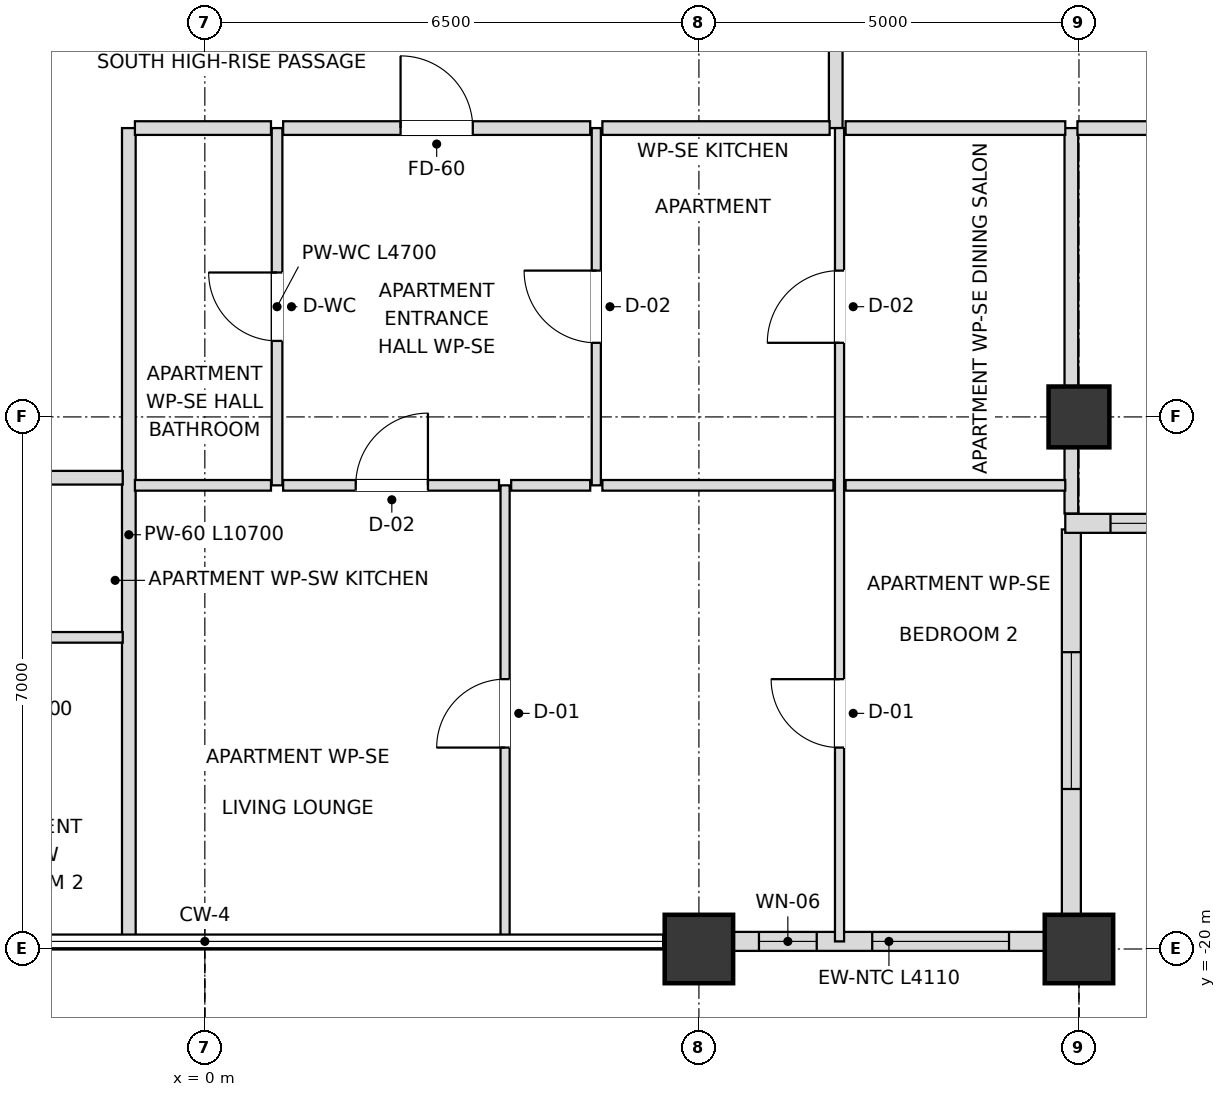
"""IFC4 building model, lengths in metres.
Left out: names, types, materials, properties, quantities, classifications, styles, units other than length and angle.
Written with IfcOpenShell. Run it as: python <this file> out.ifc"""

import sys

from ifc_helpers import new_model, si_unit, direction, frame, frame_2d, origin, origin_2d, place, context, subcontext, project, spatial, rectangle, extrude, element, fill, save


model = new_model("IFC4")
c1 = context("Model", 3, precision=1e-05, world=origin(), true_north=direction((0.0, 1.0)))
c2 = subcontext(c1, "Body", "Model", "MODEL_VIEW")
j1 = project(units=[si_unit("LENGTHUNIT", "METRE"), si_unit("PLANEANGLEUNIT", "RADIAN")], contexts=[c1])
p1 = place(None, origin())
s1 = spatial("IfcSite", under=j1, at=p1, CompositionType="ELEMENT")
p2 = place(p1, origin())
s2 = spatial("IfcBuilding", under=s1, at=p2, CompositionType="ELEMENT")
p3 = place(p2, frame((0.0, 0.0, 261.9)))
s3 = spatial("IfcBuildingStorey", under=s2, at=p3, CompositionType="ELEMENT", Elevation=261.9)
for number, where, z_axis, x_axis in (
    (1, (6.5, -20.0, 0.0), (0.0, 0.0, 1.0), (1.0, 0.0, 0.0)),
    (2, (11.5, -20.0, 0.0), (0.0, 0.0, 1.0), (1.0, 0.0, 0.0)),
):
    element("IfcColumn", number, at=place(p3, frame(where, z_axis=z_axis, x_axis=x_axis)), inside=s3, PredefinedType="USERDEFINED", context=c2, shape_type="SweptSolid", body=[
        extrude(rectangle(XDim=0.9, YDim=0.9, at=origin_2d()), origin(), (0.0, 0.0, 1.0), 3.6),
    ])
p4 = place(p3, frame((11.5, -13.0, 0.0), z_axis=(0.0, 0.0, 1.0), x_axis=(1.0, 0.0, 0.0)))
e3 = element("IfcColumn", 3, at=p4, inside=s3, PredefinedType="COLUMN", context=c2, shape_type="SweptSolid", body=[
    extrude(rectangle(XDim=0.8, YDim=0.8, at=origin_2d()), origin(), (0.0, 0.0, 1.0), 3.6),
])
p5 = place(p3, frame((6.945, -19.9, 0.0), z_axis=(0.0, 0.0, 1.0), x_axis=(1.0, 0.0, 0.0)))
e4 = element("IfcWall", 4, at=p5, inside=s3, PredefinedType="SOLIDWALL", context=c2, shape_type="SweptSolid", body=[
    extrude(rectangle(XDim=4.11, YDim=0.25, at=frame_2d((2.055, 0.0))), origin(), (0.0, 0.0, 1.0), 2.748),
])
p6 = place(p5, frame((0.345, 0.0, 0.72)))
e5 = element("IfcOpeningElement", 5, at=p6, cuts=e4, PredefinedType="OPENING", context=c2, shape_type="SweptSolid", body=[
    extrude(rectangle(XDim=0.76, YDim=1.68, at=frame_2d((0.38, 0.84))), frame((0.0, 0.135, 0.0), z_axis=(0.0, -1.0, 0.0), x_axis=(1.0, 0.0, 0.0)), (0.0, 0.0, 1.0), 0.27),
])
p7 = place(p5, frame((1.835, 0.0, 0.72)))
e6 = element("IfcOpeningElement", 6, at=p7, cuts=e4, PredefinedType="OPENING", context=c2, shape_type="SweptSolid", body=[
    extrude(rectangle(XDim=1.8, YDim=1.68, at=frame_2d((0.9, 0.84))), frame((0.0, 0.135, 0.0), z_axis=(0.0, -1.0, 0.0), x_axis=(1.0, 0.0, 0.0)), (0.0, 0.0, 1.0), 0.27),
])
p8 = place(p3, frame((11.4, -19.82, 0.0), z_axis=(0.0, 0.0, 1.0), x_axis=(0.0, 1.0, 0.0)))
e7 = element("IfcWall", 7, at=p8, inside=s3, PredefinedType="SOLIDWALL", context=c2, shape_type="SweptSolid", body=[
    extrude(rectangle(XDim=5.34, YDim=0.25, at=frame_2d((2.67, 0.0))), origin(), (0.0, 0.0, 1.0), 2.748),
])
p9 = place(p8, frame((1.925, 0.0, 0.72)))
e8 = element("IfcOpeningElement", 8, at=p9, cuts=e7, PredefinedType="OPENING", context=c2, shape_type="SweptSolid", body=[
    extrude(rectangle(XDim=1.8, YDim=1.68, at=frame_2d((0.9, 0.84))), frame((0.0, 0.135, 0.0), z_axis=(0.0, -1.0, 0.0), x_axis=(1.0, 0.0, 0.0)), (0.0, 0.0, 1.0), 0.27),
])
p10 = place(p3, frame((11.32, -14.4, 0.0), z_axis=(0.0, 0.0, 1.0), x_axis=(1.0, 0.0, 0.0)))
e9 = element("IfcWall", 9, at=p10, inside=s3, PredefinedType="SOLIDWALL", context=c2, shape_type="SweptSolid", body=[
    extrude(rectangle(XDim=5.66, YDim=0.25, at=frame_2d((2.83, 0.0))), origin(), (0.0, 0.0, 1.0), 2.748),
])
p11 = place(p10, frame((0.595, 0.0, 0.72)))
e10 = element("IfcOpeningElement", 10, at=p11, cuts=e9, PredefinedType="OPENING", context=c2, shape_type="SweptSolid", body=[
    extrude(rectangle(XDim=1.8, YDim=1.68, at=frame_2d((0.9, 0.84))), frame((0.0, 0.135, 0.0), z_axis=(0.0, -1.0, 0.0), x_axis=(1.0, 0.0, 0.0)), (0.0, 0.0, 1.0), 0.27),
])
p12 = place(p10, frame((3.265, 0.0, 0.72)))
e11 = element("IfcOpeningElement", 11, at=p12, cuts=e9, PredefinedType="OPENING", context=c2, shape_type="SweptSolid", body=[
    extrude(rectangle(XDim=1.8, YDim=1.68, at=frame_2d((0.9, 0.84))), frame((0.0, 0.135, 0.0), z_axis=(0.0, -1.0, 0.0), x_axis=(1.0, 0.0, 0.0)), (0.0, 0.0, 1.0), 0.27),
])
p13 = place(p3, frame((-1.0, -19.9, 0.0), z_axis=(0.0, 0.0, 1.0), x_axis=(0.0, 1.0, 0.0)))
e12 = element("IfcWall", 12, at=p13, inside=s3, PredefinedType="PARTITIONING", context=c2, shape_type="SweptSolid", body=[
    extrude(rectangle(XDim=10.7, YDim=0.18, at=frame_2d((5.35, 0.0))), origin(), (0.0, 0.0, 1.0), 3.018),
])
p14 = place(p3, frame((0.95, -13.9, 0.0), z_axis=(0.0, 0.0, 1.0), x_axis=(0.0, 1.0, 0.0)))
e13 = element("IfcWall", 13, at=p14, inside=s3, PredefinedType="PARTITIONING", context=c2, shape_type="SweptSolid", body=[
    extrude(rectangle(XDim=4.7, YDim=0.14, at=frame_2d((2.35, 0.0))), origin(), (0.0, 0.0, 1.0), 3.38),
])
p15 = place(p14, frame((1.9, 0.0, 0.0)))
e14 = element("IfcOpeningElement", 14, at=p15, cuts=e13, PredefinedType="OPENING", context=c2, shape_type="SweptSolid", body=[
    extrude(rectangle(XDim=0.9, YDim=2.1, at=frame_2d((0.45, 1.05))), frame((0.0, 0.08, 0.0), z_axis=(0.0, -1.0, 0.0), x_axis=(1.0, 0.0, 0.0)), (0.0, 0.0, 1.0), 0.16),
])
p16 = place(p3, frame((3.95, -19.9, 0.0), z_axis=(0.0, 0.0, 1.0), x_axis=(0.0, 1.0, 0.0)))
e15 = element("IfcWall", 15, at=p16, inside=s3, PredefinedType="PARTITIONING", context=c2, shape_type="SweptSolid", body=[
    extrude(rectangle(XDim=6.0, YDim=0.12, at=frame_2d((3.0, 0.0))), origin(), (0.0, 0.0, 1.0), 3.018),
])
p17 = place(p16, frame((2.55, 0.0, 0.0)))
e16 = element("IfcOpeningElement", 16, at=p17, cuts=e15, PredefinedType="OPENING", context=c2, shape_type="SweptSolid", body=[
    extrude(rectangle(XDim=0.9, YDim=2.1, at=frame_2d((0.45, 1.05))), frame((0.0, 0.07, 0.0), z_axis=(0.0, -1.0, 0.0), x_axis=(1.0, 0.0, 0.0)), (0.0, 0.0, 1.0), 0.14),
])
p18 = place(p3, frame((5.15, -13.9, 0.0), z_axis=(0.0, 0.0, 1.0), x_axis=(0.0, 1.0, 0.0)))
e17 = element("IfcWall", 17, at=p18, inside=s3, PredefinedType="PARTITIONING", context=c2, shape_type="SweptSolid", body=[
    extrude(rectangle(XDim=4.7, YDim=0.12, at=frame_2d((2.35, 0.0))), origin(), (0.0, 0.0, 1.0), 3.38),
])
p19 = place(p18, frame((1.875, 0.0, 0.0)))
e18 = element("IfcOpeningElement", 18, at=p19, cuts=e17, PredefinedType="OPENING", context=c2, shape_type="SweptSolid", body=[
    extrude(rectangle(XDim=0.95, YDim=2.1, at=frame_2d((0.475, 1.05))), frame((0.0, 0.07, 0.0), z_axis=(0.0, -1.0, 0.0), x_axis=(1.0, 0.0, 0.0)), (0.0, 0.0, 1.0), 0.14),
])
p20 = place(p3, frame((8.3, -9.2, 0.0), z_axis=(0.0, 0.0, 1.0), x_axis=(0.0, 1.0, 0.0)))
e19 = element("IfcWall", 19, at=p20, inside=s3, PredefinedType="PARTITIONING", context=c2, shape_type="SweptSolid", body=[
    extrude(rectangle(XDim=5.4, YDim=0.18, at=frame_2d((2.7, 0.0))), origin(), (0.0, 0.0, 1.0), 2.826),
])
p21 = place(p20, frame((3.125, 0.0, 0.0)))
e20 = element("IfcOpeningElement", 20, at=p21, cuts=e19, PredefinedType="OPENING", context=c2, shape_type="SweptSolid", body=[
    extrude(rectangle(XDim=0.95, YDim=2.15, at=frame_2d((0.475, 1.075))), frame((0.0, 0.1, 0.0), z_axis=(0.0, -1.0, 0.0), x_axis=(1.0, 0.0, 0.0)), (0.0, 0.0, 1.0), 0.2),
])
p22 = place(p3, frame((8.35, -19.9, 0.0), z_axis=(0.0, 0.0, 1.0), x_axis=(0.0, 1.0, 0.0)))
e21 = element("IfcWall", 21, at=p22, inside=s3, PredefinedType="PARTITIONING", context=c2, shape_type="SweptSolid", body=[
    extrude(rectangle(XDim=10.7, YDim=0.12, at=frame_2d((5.35, 0.0))), origin(), (0.0, 0.0, 1.0), 2.826),
])
p23 = place(p22, frame((7.875, 0.0, 0.0)))
e22 = element("IfcOpeningElement", 22, at=p23, cuts=e21, PredefinedType="OPENING", context=c2, shape_type="SweptSolid", body=[
    extrude(rectangle(XDim=0.95, YDim=2.1, at=frame_2d((0.475, 1.05))), frame((0.0, 0.07, 0.0), z_axis=(0.0, -1.0, 0.0), x_axis=(1.0, 0.0, 0.0)), (0.0, 0.0, 1.0), 0.14),
])
p24 = place(p22, frame((2.55, 0.0, 0.0)))
e23 = element("IfcOpeningElement", 23, at=p24, cuts=e21, PredefinedType="OPENING", context=c2, shape_type="SweptSolid", body=[
    extrude(rectangle(XDim=0.9, YDim=2.1, at=frame_2d((0.45, 1.05))), frame((0.0, 0.07, 0.0), z_axis=(0.0, -1.0, 0.0), x_axis=(1.0, 0.0, 0.0)), (0.0, 0.0, 1.0), 0.14),
])
p25 = place(p3, frame((11.4, -14.27, 0.0), z_axis=(0.0, 0.0, 1.0), x_axis=(0.0, 1.0, 0.0)))
e24 = element("IfcWall", 24, at=p25, inside=s3, PredefinedType="PARTITIONING", context=c2, shape_type="SweptSolid", body=[
    extrude(rectangle(XDim=5.07, YDim=0.18, at=frame_2d((2.535, 0.0))), origin(), (0.0, 0.0, 1.0), 2.748),
])
p26 = place(p3, frame((-3.62, -15.9, 0.0), z_axis=(0.0, 0.0, 1.0), x_axis=(1.0, 0.0, 0.0)))
e25 = element("IfcWall", 25, at=p26, inside=s3, PredefinedType="PARTITIONING", context=c2, shape_type="SweptSolid", body=[
    extrude(rectangle(XDim=2.54, YDim=0.14, at=frame_2d((1.27, 0.0))), origin(), (0.0, 0.0, 1.0), 3.38),
])
p27 = place(p3, frame((-0.92, -13.9, 0.0), z_axis=(0.0, 0.0, 1.0), x_axis=(1.0, 0.0, 0.0)))
e26 = element("IfcWall", 26, at=p27, inside=s3, PredefinedType="PARTITIONING", context=c2, shape_type="SweptSolid", body=[
    extrude(rectangle(XDim=1.79, YDim=0.14, at=frame_2d((0.895, 0.0))), origin(), (0.0, 0.0, 1.0), 3.38),
])
p28 = place(p3, frame((1.03, -13.9, 0.0), z_axis=(0.0, 0.0, 1.0), x_axis=(1.0, 0.0, 0.0)))
e27 = element("IfcWall", 27, at=p28, inside=s3, PredefinedType="PARTITIONING", context=c2, shape_type="SweptSolid", body=[
    extrude(rectangle(XDim=2.84, YDim=0.14, at=frame_2d((1.42, 0.0))), origin(), (0.0, 0.0, 1.0), 3.38),
])
p29 = place(p28, frame((0.955, 0.0, 0.0)))
e28 = element("IfcOpeningElement", 28, at=p29, cuts=e27, PredefinedType="OPENING", context=c2, shape_type="SweptSolid", body=[
    extrude(rectangle(XDim=0.95, YDim=2.1, at=frame_2d((0.475, 1.05))), frame((0.0, 0.08, 0.0), z_axis=(0.0, -1.0, 0.0), x_axis=(1.0, 0.0, 0.0)), (0.0, 0.0, 1.0), 0.16),
])
p30 = place(p3, frame((4.03, -13.9, 0.0), z_axis=(0.0, 0.0, 1.0), x_axis=(1.0, 0.0, 0.0)))
e29 = element("IfcWall", 29, at=p30, inside=s3, PredefinedType="PARTITIONING", context=c2, shape_type="SweptSolid", body=[
    extrude(rectangle(XDim=1.04, YDim=0.14, at=frame_2d((0.52, 0.0))), origin(), (0.0, 0.0, 1.0), 3.38),
])
p31 = place(p3, frame((5.23, -13.9, 0.0), z_axis=(0.0, 0.0, 1.0), x_axis=(1.0, 0.0, 0.0)))
e30 = element("IfcWall", 30, at=p31, inside=s3, PredefinedType="PARTITIONING", context=c2, shape_type="SweptSolid", body=[
    extrude(rectangle(XDim=3.04, YDim=0.14, at=frame_2d((1.52, 0.0))), origin(), (0.0, 0.0, 1.0), 2.826),
])
p32 = place(p3, frame((8.43, -13.9, 0.0), z_axis=(0.0, 0.0, 1.0), x_axis=(1.0, 0.0, 0.0)))
e31 = element("IfcWall", 31, at=p32, inside=s3, PredefinedType="PARTITIONING", context=c2, shape_type="SweptSolid", body=[
    extrude(rectangle(XDim=2.89, YDim=0.14, at=frame_2d((1.445, 0.0))), origin(), (0.0, 0.0, 1.0), 3.38),
])
p33 = place(p3, frame((-3.62, -13.8, 0.0), z_axis=(0.0, 0.0, 1.0), x_axis=(1.0, 0.0, 0.0)))
e32 = element("IfcWall", 32, at=p33, inside=s3, PredefinedType="PARTITIONING", context=c2, shape_type="SweptSolid", body=[
    extrude(rectangle(XDim=2.54, YDim=0.18, at=frame_2d((1.27, 0.0))), origin(), (0.0, 0.0, 1.0), 3.38),
])
p34 = place(p3, frame((-0.92, -9.2, 0.0), z_axis=(0.0, 0.0, 1.0), x_axis=(1.0, 0.0, 0.0)))
e33 = element("IfcWall", 33, at=p34, inside=s3, PredefinedType="PARTITIONING", context=c2, shape_type="SweptSolid", body=[
    extrude(rectangle(XDim=1.79, YDim=0.18, at=frame_2d((0.895, 0.0))), origin(), (0.0, 0.0, 1.0), 3.38),
])
p35 = place(p3, frame((1.03, -9.2, 0.0), z_axis=(0.0, 0.0, 1.0), x_axis=(1.0, 0.0, 0.0)))
e34 = element("IfcWall", 34, at=p35, inside=s3, PredefinedType="PARTITIONING", context=c2, shape_type="SweptSolid", body=[
    extrude(rectangle(XDim=4.04, YDim=0.18, at=frame_2d((2.02, 0.0))), origin(), (0.0, 0.0, 1.0), 3.38),
])
p36 = place(p35, frame((1.545, 0.0, 0.0)))
e35 = element("IfcOpeningElement", 35, at=p36, cuts=e34, PredefinedType="OPENING", context=c2, shape_type="SweptSolid", body=[
    extrude(rectangle(XDim=0.95, YDim=2.15, at=frame_2d((0.475, 1.075))), frame((0.0, 0.1, 0.0), z_axis=(0.0, -1.0, 0.0), x_axis=(1.0, 0.0, 0.0)), (0.0, 0.0, 1.0), 0.2),
])
p37 = place(p3, frame((5.23, -9.2, 0.0), z_axis=(0.0, 0.0, 1.0), x_axis=(1.0, 0.0, 0.0)))
e36 = element("IfcWall", 36, at=p37, inside=s3, PredefinedType="PARTITIONING", context=c2, shape_type="SweptSolid", body=[
    extrude(rectangle(XDim=2.99, YDim=0.18, at=frame_2d((1.495, 0.0))), origin(), (0.0, 0.0, 1.0), 2.826),
])
p38 = place(p3, frame((8.43, -9.2, 0.0), z_axis=(0.0, 0.0, 1.0), x_axis=(1.0, 0.0, 0.0)))
e37 = element("IfcWall", 37, at=p38, inside=s3, PredefinedType="PARTITIONING", context=c2, shape_type="SweptSolid", body=[
    extrude(rectangle(XDim=2.89, YDim=0.18, at=frame_2d((1.445, 0.0))), origin(), (0.0, 0.0, 1.0), 3.38),
])
p39 = place(p3, frame((11.48, -9.2, 0.0), z_axis=(0.0, 0.0, 1.0), x_axis=(1.0, 0.0, 0.0)))
e38 = element("IfcWall", 38, at=p39, inside=s3, PredefinedType="PARTITIONING", context=c2, shape_type="SweptSolid", body=[
    extrude(rectangle(XDim=5.34, YDim=0.18, at=frame_2d((2.67, 0.0))), origin(), (0.0, 0.0, 1.0), 3.38),
])
p40 = place(p6, origin())
e39 = element("IfcWindow", 39, at=p40, inside=s3, PartitioningType="SINGLE_PANEL", PredefinedType="WINDOW", context=c2, shape_type="SweptSolid", body=[
    extrude(rectangle(XDim=0.76, YDim=1.68, at=frame_2d((0.38, 0.84))), frame((0.0, 0.03, 0.0), z_axis=(0.0, -1.0, 0.0), x_axis=(1.0, 0.0, 0.0)), (0.0, 0.0, 1.0), 0.06),
])
fill(e5, e39)
p41 = place(p7, origin())
e40 = element("IfcWindow", 40, at=p41, inside=s3, PartitioningType="SINGLE_PANEL", PredefinedType="WINDOW", context=c2, shape_type="SweptSolid", body=[
    extrude(rectangle(XDim=1.8, YDim=1.68, at=frame_2d((0.9, 0.84))), frame((0.0, 0.03, 0.0), z_axis=(0.0, -1.0, 0.0), x_axis=(1.0, 0.0, 0.0)), (0.0, 0.0, 1.0), 0.06),
])
fill(e6, e40)
p42 = place(p9, origin())
e41 = element("IfcWindow", 41, at=p42, inside=s3, PartitioningType="SINGLE_PANEL", PredefinedType="WINDOW", context=c2, shape_type="SweptSolid", body=[
    extrude(rectangle(XDim=1.8, YDim=1.68, at=frame_2d((0.9, 0.84))), frame((0.0, 0.03, 0.0), z_axis=(0.0, -1.0, 0.0), x_axis=(1.0, 0.0, 0.0)), (0.0, 0.0, 1.0), 0.06),
])
fill(e8, e41)
p43 = place(p11, origin())
e42 = element("IfcWindow", 42, at=p43, inside=s3, PartitioningType="SINGLE_PANEL", PredefinedType="WINDOW", context=c2, shape_type="SweptSolid", body=[
    extrude(rectangle(XDim=1.8, YDim=1.68, at=frame_2d((0.9, 0.84))), frame((0.0, 0.03, 0.0), z_axis=(0.0, -1.0, 0.0), x_axis=(1.0, 0.0, 0.0)), (0.0, 0.0, 1.0), 0.06),
])
fill(e10, e42)
p44 = place(p15, origin())
e43 = element("IfcDoor", 43, at=p44, inside=s3, OperationType="SINGLE_SWING_RIGHT", PredefinedType="DOOR", context=c2, shape_type="SweptSolid", body=[
    extrude(rectangle(XDim=0.9, YDim=2.1, at=frame_2d((0.45, 1.05))), frame((0.0, 0.025, 0.0), z_axis=(0.0, -1.0, 0.0), x_axis=(1.0, 0.0, 0.0)), (0.0, 0.0, 1.0), 0.05),
])
fill(e14, e43)
p45 = place(p36, origin())
e44 = element("IfcDoor", 44, at=p45, inside=s3, OperationType="SINGLE_SWING_LEFT", PredefinedType="DOOR", context=c2, shape_type="SweptSolid", body=[
    extrude(rectangle(XDim=0.95, YDim=2.15, at=frame_2d((0.475, 1.075))), frame((0.0, 0.025, 0.0), z_axis=(0.0, -1.0, 0.0), x_axis=(1.0, 0.0, 0.0)), (0.0, 0.0, 1.0), 0.05),
])
fill(e35, e44)
p46 = place(p19, origin())
e45 = element("IfcDoor", 45, at=p46, inside=s3, OperationType="SINGLE_SWING_RIGHT", PredefinedType="DOOR", context=c2, shape_type="SweptSolid", body=[
    extrude(rectangle(XDim=0.95, YDim=2.1, at=frame_2d((0.475, 1.05))), frame((0.0, 0.025, 0.0), z_axis=(0.0, -1.0, 0.0), x_axis=(1.0, 0.0, 0.0)), (0.0, 0.0, 1.0), 0.05),
])
fill(e18, e45)
p47 = place(p23, origin())
e46 = element("IfcDoor", 46, at=p47, inside=s3, OperationType="SINGLE_SWING_LEFT", PredefinedType="DOOR", context=c2, shape_type="SweptSolid", body=[
    extrude(rectangle(XDim=0.95, YDim=2.1, at=frame_2d((0.475, 1.05))), frame((0.0, 0.025, 0.0), z_axis=(0.0, -1.0, 0.0), x_axis=(1.0, 0.0, 0.0)), (0.0, 0.0, 1.0), 0.05),
])
fill(e22, e46)
p48 = place(p29, origin())
e47 = element("IfcDoor", 47, at=p48, inside=s3, OperationType="SINGLE_SWING_RIGHT", PredefinedType="DOOR", context=c2, shape_type="SweptSolid", body=[
    extrude(rectangle(XDim=0.95, YDim=2.1, at=frame_2d((0.475, 1.05))), frame((0.0, 0.025, 0.0), z_axis=(0.0, -1.0, 0.0), x_axis=(1.0, 0.0, 0.0)), (0.0, 0.0, 1.0), 0.05),
])
fill(e28, e47)
p49 = place(p17, origin())
e48 = element("IfcDoor", 48, at=p49, inside=s3, OperationType="SINGLE_SWING_LEFT", PredefinedType="DOOR", context=c2, shape_type="SweptSolid", body=[
    extrude(rectangle(XDim=0.9, YDim=2.1, at=frame_2d((0.45, 1.05))), frame((0.0, 0.025, 0.0), z_axis=(0.0, -1.0, 0.0), x_axis=(1.0, 0.0, 0.0)), (0.0, 0.0, 1.0), 0.05),
])
fill(e16, e48)
p50 = place(p24, origin())
e49 = element("IfcDoor", 49, at=p50, inside=s3, OperationType="SINGLE_SWING_RIGHT", PredefinedType="DOOR", context=c2, shape_type="SweptSolid", body=[
    extrude(rectangle(XDim=0.9, YDim=2.1, at=frame_2d((0.45, 1.05))), frame((0.0, 0.025, 0.0), z_axis=(0.0, -1.0, 0.0), x_axis=(1.0, 0.0, 0.0)), (0.0, 0.0, 1.0), 0.05),
])
fill(e23, e49)
save(model, sys.argv[1])
